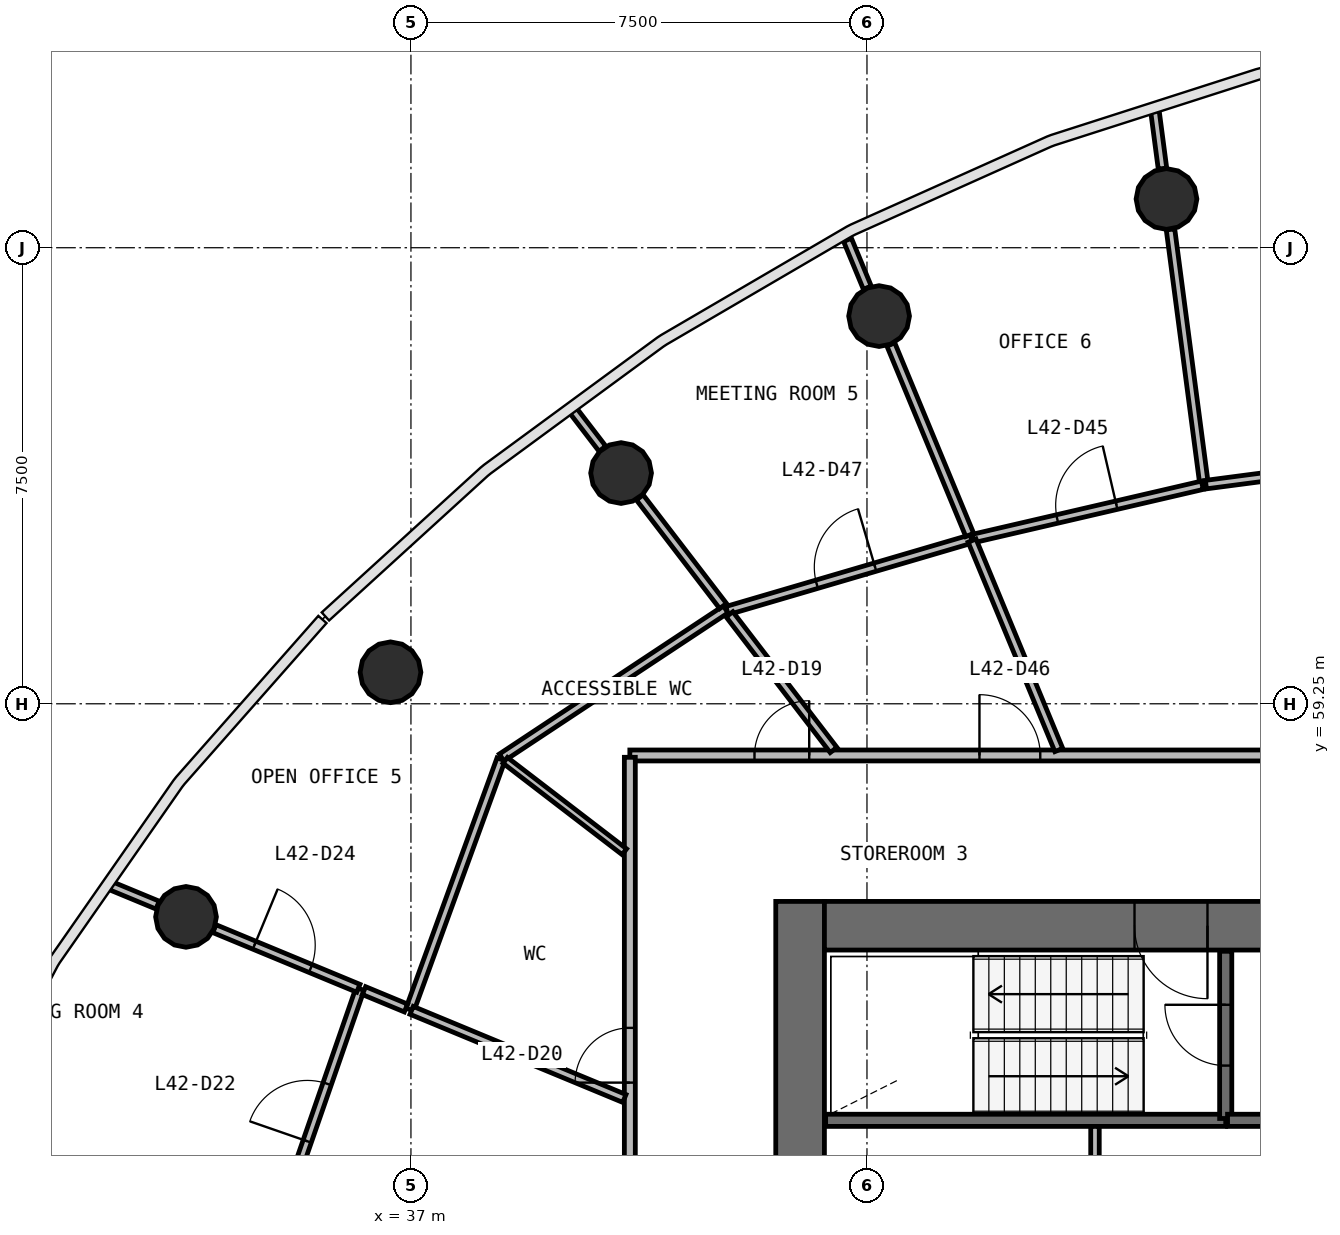
"""IFC4 building model, lengths in metres.
Left out: names, types, materials, properties, quantities, classifications, styles, units other than length and angle.
Written with IfcOpenShell. Run it as: python <this file> out.ifc"""

import sys

from ifc_helpers import new_model, si_unit, direction, frame, frame_2d, origin, origin_2d, place, context, subcontext, project, spatial, rectangle, circle, extrude, source, transform, mapped, element, fill, save


model = new_model("IFC4")
c1 = context("Model", 3, precision=1e-05, world=origin(), true_north=direction((0.0, 1.0)))
c2 = subcontext(c1, "Body", "Model", "MODEL_VIEW")
j1 = project(units=[si_unit("LENGTHUNIT", "METRE"), si_unit("PLANEANGLEUNIT", "RADIAN")], contexts=[c1])
p1 = place(None, origin())
s1 = spatial("IfcSite", under=j1, at=p1, CompositionType="ELEMENT")
p2 = place(p1, origin())
s2 = spatial("IfcBuilding", under=s1, at=p2, CompositionType="ELEMENT")
p3 = place(p2, frame((0.0, 0.0, 176.0)))
s3 = spatial("IfcBuildingStorey", under=s2, at=p3, CompositionType="ELEMENT", Elevation=176.0)
p4 = place(p3, frame((43.4, 56.0, 0.0), z_axis=(0.0, 0.0, 1.0), x_axis=(0.0, -1.0, 0.0)))
e1 = element("IfcWall", 1, at=p4, inside=s3, PredefinedType="SHEAR", context=c2, shape_type="SweptSolid", body=[
    extrude(rectangle(XDim=16.0, YDim=0.8, at=frame_2d((8.0, 0.0))), origin(), (0.0, 0.0, 1.0), 3.9),
])
p5 = place(p4, frame((7.1, 0.0, 0.0)))
e2 = element("IfcOpeningElement", 2, at=p5, cuts=e1, PredefinedType="OPENING", context=c2, shape_type="SweptSolid", body=[
    extrude(rectangle(XDim=1.8, YDim=2.1, at=frame_2d((0.9, 1.05))), frame((0.0, 0.41, 0.0), z_axis=(0.0, -1.0, 0.0), x_axis=(1.0, 0.0, 0.0)), (0.0, 0.0, 1.0), 0.82),
])
p6 = place(p3, frame((60.2, 55.6, 0.0), z_axis=(0.0, 0.0, 1.0), x_axis=(-1.0, 0.0, 0.0)))
e3 = element("IfcWall", 3, at=p6, inside=s3, PredefinedType="SHEAR", context=c2, shape_type="SweptSolid", body=[
    extrude(rectangle(XDim=16.4, YDim=0.8, at=frame_2d((8.2, 0.0))), origin(), (0.0, 0.0, 1.0), 3.9),
])
p7 = place(p6, frame((0.2, 0.0, 0.0)))
e4 = element("IfcOpeningElement", 4, at=p7, cuts=e3, PredefinedType="OPENING", context=c2, shape_type="SweptSolid", body=[
    extrude(rectangle(XDim=1.1, YDim=2.1, at=frame_2d((0.55, 1.05))), frame((0.0, 0.41, 0.0), z_axis=(0.0, -1.0, 0.0), x_axis=(1.0, 0.0, 0.0)), (0.0, 0.0, 1.0), 0.82),
])
p8 = place(p6, frame((10.1, 0.0, 0.0)))
e5 = element("IfcOpeningElement", 5, at=p8, cuts=e3, PredefinedType="OPENING", context=c2, shape_type="SweptSolid", body=[
    extrude(rectangle(XDim=1.2, YDim=2.1, at=frame_2d((0.6, 1.05))), frame((0.0, 0.41, 0.0), z_axis=(0.0, -1.0, 0.0), x_axis=(1.0, 0.0, 0.0)), (0.0, 0.0, 1.0), 0.82),
])
p9 = place(p6, frame((7.05, 0.0, 0.0)))
e6 = element("IfcOpeningElement", 6, at=p9, cuts=e3, PredefinedType="OPENING", context=c2, shape_type="SweptSolid", body=[
    extrude(rectangle(XDim=1.1, YDim=2.1, at=frame_2d((0.55, 1.05))), frame((0.0, 0.41, 0.0), z_axis=(0.0, -1.0, 0.0), x_axis=(1.0, 0.0, 0.0)), (0.0, 0.0, 1.0), 0.82),
])
m1 = source(origin(), c2, "Body", "SweptSolid", [
    extrude(circle(Radius=0.5, at=origin_2d()), origin(), (0.0, 0.0, 1.0), 3.9),
])
for number, where, z_axis, x_axis in (
    (7, (49.426, 67.551, 0.0), (0.0, 0.0, 1.0), (1.0, 0.0, 0.0)),
    (8, (44.699, 65.626, 0.0), (0.0, 0.0, 1.0), (1.0, 0.0, 0.0)),
    (9, (40.456, 63.044, 0.0), (0.0, 0.0, 1.0), (1.0, 0.0, 0.0)),
    (10, (36.664, 59.768, 0.0), (0.0, 0.0, 1.0), (1.0, 0.0, 0.0)),
    (11, (33.301, 55.746, 0.0), (0.0, 0.0, 1.0), (1.0, 0.0, 0.0)),
):
    element("IfcColumn", number, at=place(p3, frame(where, z_axis=z_axis, x_axis=x_axis)), inside=s3, PredefinedType="COLUMN", context=c2, shape_type="MappedRepresentation", body=[
        mapped(m1, transform((0.0, 0.0, 0.0), scale=1.0)),
    ])
p10 = place(p3, frame((43.82, 52.4, 0.0), z_axis=(0.0, 0.0, 1.0), x_axis=(1.0, 0.0, 0.0)))
e12 = element("IfcWall", 12, at=p10, inside=s3, PredefinedType="SOLIDWALL", context=c2, shape_type="SweptSolid", body=[
    extrude(rectangle(XDim=6.58, YDim=0.2, at=frame_2d((3.29, 0.0))), origin(), (0.0, 0.0, 1.0), 3.4),
])
p11 = place(p3, frame((50.4, 52.43, 0.0), z_axis=(0.0, 0.0, 1.0), x_axis=(0.0, 1.0, 0.0)))
e13 = element("IfcWall", 13, at=p11, inside=s3, PredefinedType="SOLIDWALL", context=c2, shape_type="SweptSolid", body=[
    extrude(rectangle(XDim=2.75, YDim=0.2, at=frame_2d((1.375, 0.0))), origin(), (0.0, 0.0, 1.0), 3.4),
])
p12 = place(p11, frame((0.87, 0.0, 0.0)))
e14 = element("IfcOpeningElement", 14, at=p12, cuts=e13, PredefinedType="OPENING", context=c2, shape_type="SweptSolid", body=[
    extrude(rectangle(XDim=1.0, YDim=2.1, at=frame_2d((0.5, 1.05))), frame((0.0, 0.11, 0.0), z_axis=(0.0, -1.0, 0.0), x_axis=(1.0, 0.0, 0.0)), (0.0, 0.0, 1.0), 0.22),
])
p13 = place(p3, frame((50.43, 52.4, 0.0), z_axis=(0.0, 0.0, 1.0), x_axis=(1.0, 0.0, 0.0)))
e15 = element("IfcWall", 15, at=p13, inside=s3, PredefinedType="SOLIDWALL", context=c2, shape_type="SweptSolid", body=[
    extrude(rectangle(XDim=2.24, YDim=0.2, at=frame_2d((1.12, 0.0))), origin(), (0.0, 0.0, 1.0), 3.4),
])
p14 = place(p3, frame((40.6, 58.4, 0.0), z_axis=(0.0, 0.0, 1.0), x_axis=(1.0, 0.0, 0.0)))
e16 = element("IfcWall", 16, at=p14, inside=s3, PredefinedType="PARTITIONING", context=c2, shape_type="SweptSolid", body=[
    extrude(rectangle(XDim=22.8, YDim=0.18, at=frame_2d((11.4, 0.0))), origin(), (0.0, 0.0, 1.0), 2.7),
])
p15 = place(p14, frame((2.05, 0.0, 0.0)))
e17 = element("IfcOpeningElement", 17, at=p15, cuts=e16, PredefinedType="OPENING", context=c2, shape_type="SweptSolid", body=[
    extrude(rectangle(XDim=0.9, YDim=2.1, at=frame_2d((0.45, 1.05))), frame((0.0, 0.1, 0.0), z_axis=(0.0, -1.0, 0.0), x_axis=(1.0, 0.0, 0.0)), (0.0, 0.0, 1.0), 0.2),
])
p16 = place(p14, frame((16.15, 0.0, 0.0)))
e18 = element("IfcOpeningElement", 18, at=p16, cuts=e16, PredefinedType="OPENING", context=c2, shape_type="SweptSolid", body=[
    extrude(rectangle(XDim=1.0, YDim=2.1, at=frame_2d((0.5, 1.05))), frame((0.0, 0.1, 0.0), z_axis=(0.0, -1.0, 0.0), x_axis=(1.0, 0.0, 0.0)), (0.0, 0.0, 1.0), 0.2),
])
p17 = place(p14, frame((10.95, 0.0, 0.0)))
e19 = element("IfcOpeningElement", 19, at=p17, cuts=e16, PredefinedType="OPENING", context=c2, shape_type="SweptSolid", body=[
    extrude(rectangle(XDim=1.0, YDim=2.1, at=frame_2d((0.5, 1.05))), frame((0.0, 0.1, 0.0), z_axis=(0.0, -1.0, 0.0), x_axis=(1.0, 0.0, 0.0)), (0.0, 0.0, 1.0), 0.2),
])
p18 = place(p14, frame((5.75, 0.0, 0.0)))
e20 = element("IfcOpeningElement", 20, at=p18, cuts=e16, PredefinedType="OPENING", context=c2, shape_type="SweptSolid", body=[
    extrude(rectangle(XDim=1.0, YDim=2.1, at=frame_2d((0.5, 1.05))), frame((0.0, 0.1, 0.0), z_axis=(0.0, -1.0, 0.0), x_axis=(1.0, 0.0, 0.0)), (0.0, 0.0, 1.0), 0.2),
])
p19 = place(p3, frame((40.6, 37.63, 0.0), z_axis=(0.0, 0.0, 1.0), x_axis=(0.0, 1.0, 0.0)))
e21 = element("IfcWall", 21, at=p19, inside=s3, PredefinedType="PARTITIONING", context=c2, shape_type="SweptSolid", body=[
    extrude(rectangle(XDim=20.74, YDim=0.18, at=frame_2d((10.37, 0.0))), origin(), (0.0, 0.0, 1.0), 2.7),
])
p20 = place(p19, frame((15.39, 0.0, 0.0)))
e22 = element("IfcOpeningElement", 22, at=p20, cuts=e21, PredefinedType="OPENING", context=c2, shape_type="SweptSolid", body=[
    extrude(rectangle(XDim=0.9, YDim=2.1, at=frame_2d((0.45, 1.05))), frame((0.0, 0.1, 0.0), z_axis=(0.0, -1.0, 0.0), x_axis=(1.0, 0.0, 0.0)), (0.0, 0.0, 1.0), 0.2),
])
p21 = place(p19, frame((9.89, 0.0, 0.0)))
e23 = element("IfcOpeningElement", 23, at=p21, cuts=e21, PredefinedType="OPENING", context=c2, shape_type="SweptSolid", body=[
    extrude(rectangle(XDim=1.0, YDim=2.1, at=frame_2d((0.5, 1.05))), frame((0.0, 0.1, 0.0), z_axis=(0.0, -1.0, 0.0), x_axis=(1.0, 0.0, 0.0)), (0.0, 0.0, 1.0), 0.2),
])
p22 = place(p19, frame((7.69, 0.0, 0.0)))
e24 = element("IfcOpeningElement", 24, at=p22, cuts=e21, PredefinedType="OPENING", context=c2, shape_type="SweptSolid", body=[
    extrude(rectangle(XDim=1.0, YDim=2.1, at=frame_2d((0.5, 1.05))), frame((0.0, 0.1, 0.0), z_axis=(0.0, -1.0, 0.0), x_axis=(1.0, 0.0, 0.0)), (0.0, 0.0, 1.0), 0.2),
])
p23 = place(p3, frame((34.689, 50.309, 0.0), z_axis=(0.0, 0.0, 1.0), x_axis=(0.327550319444, 0.944833735761, 0.0)))
e25 = element("IfcWall", 25, at=p23, inside=s3, PredefinedType="PARTITIONING", context=c2, shape_type="SweptSolid", body=[
    extrude(rectangle(XDim=4.5, YDim=0.14, at=frame_2d((2.25, 0.0))), origin(), (0.0, 0.0, 1.0), 2.7),
])
p24 = place(p23, frame((1.85, 0.0, 0.0)))
e26 = element("IfcOpeningElement", 26, at=p24, cuts=e25, PredefinedType="OPENING", context=c2, shape_type="SweptSolid", body=[
    extrude(rectangle(XDim=1.0, YDim=2.1, at=frame_2d((0.5, 1.05))), frame((0.0, 0.08, 0.0), z_axis=(0.0, -1.0, 0.0), x_axis=(1.0, 0.0, 0.0)), (0.0, 0.0, 1.0), 0.16),
])
p25 = place(p3, frame((42.177, 60.802, 0.0), z_axis=(0.0, 0.0, 1.0), x_axis=(-0.83401747031, -0.551738034957, 0.0)))
e27 = element("IfcWall", 27, at=p25, inside=s3, PredefinedType="PARTITIONING", context=c2, shape_type="SweptSolid", body=[
    extrude(rectangle(XDim=4.418, YDim=0.14, at=frame_2d((2.209, 0.0))), origin(), (0.0, 0.0, 1.0), 2.7),
])
p26 = place(p3, frame((38.482, 58.337, 0.0), z_axis=(0.0, 0.0, 1.0), x_axis=(-0.342007049078, -0.939697386599, 0.0)))
e28 = element("IfcWall", 28, at=p26, inside=s3, PredefinedType="PARTITIONING", context=c2, shape_type="SweptSolid", body=[
    extrude(rectangle(XDim=4.381, YDim=0.14, at=frame_2d((2.19, 0.0))), origin(), (0.0, 0.0, 1.0), 2.7),
])
p27 = place(p3, frame((50.045, 62.85, 0.0), z_axis=(0.0, 0.0, 1.0), x_axis=(-0.130506679213, 0.991447430115, 0.0)))
e29 = element("IfcWall", 29, at=p27, inside=s3, PredefinedType="PARTITIONING", context=c2, shape_type="SweptSolid", body=[
    extrude(rectangle(XDim=4.237, YDim=0.14, at=frame_2d((2.119, 0.0))), origin(), (0.0, 0.0, 1.0), 2.7),
])
p28 = place(p3, frame((42.199, 60.782, 0.0), z_axis=(0.0, 0.0, 1.0), x_axis=(0.959552813839, 0.28152867963, 0.0)))
e30 = element("IfcWall", 30, at=p28, inside=s3, PredefinedType="PARTITIONING", context=c2, shape_type="SweptSolid", body=[
    extrude(rectangle(XDim=4.188, YDim=0.14, at=frame_2d((2.094, 0.0))), origin(), (0.0, 0.0, 1.0), 2.7),
])
p29 = place(p28, frame((1.538, 0.0, 0.0)))
e31 = element("IfcOpeningElement", 31, at=p29, cuts=e30, PredefinedType="OPENING", context=c2, shape_type="SweptSolid", body=[
    extrude(rectangle(XDim=1.0, YDim=2.1, at=frame_2d((0.5, 1.05))), frame((0.0, 0.08, 0.0), z_axis=(0.0, -1.0, 0.0), x_axis=(1.0, 0.0, 0.0)), (0.0, 0.0, 1.0), 0.16),
])
p30 = place(p3, frame((50.075, 62.854, 0.0), z_axis=(0.0, 0.0, 1.0), x_axis=(0.991489154897, 0.130189307246, 0.0)))
e32 = element("IfcWall", 32, at=p30, inside=s3, PredefinedType="PARTITIONING", context=c2, shape_type="SweptSolid", body=[
    extrude(rectangle(XDim=3.953, YDim=0.14, at=frame_2d((1.977, 0.0))), origin(), (0.0, 0.0, 1.0), 2.7),
])
p31 = place(p30, frame((1.503, 0.0, 0.0)))
e33 = element("IfcOpeningElement", 33, at=p31, cuts=e32, PredefinedType="OPENING", context=c2, shape_type="SweptSolid", body=[
    extrude(rectangle(XDim=1.0, YDim=2.1, at=frame_2d((0.5, 1.05))), frame((0.0, 0.08, 0.0), z_axis=(0.0, -1.0, 0.0), x_axis=(1.0, 0.0, 0.0)), (0.0, 0.0, 1.0), 0.16),
])
p32 = place(p3, frame((46.246, 61.968, 0.0), z_axis=(0.0, 0.0, 1.0), x_axis=(0.974087273118, 0.226172465941, 0.0)))
e34 = element("IfcWall", 34, at=p32, inside=s3, PredefinedType="PARTITIONING", context=c2, shape_type="SweptSolid", body=[
    extrude(rectangle(XDim=3.87, YDim=0.14, at=frame_2d((1.935, 0.0))), origin(), (0.0, 0.0, 1.0), 2.7),
])
p33 = place(p32, frame((1.42, 0.0, 0.0)))
e35 = element("IfcOpeningElement", 35, at=p33, cuts=e34, PredefinedType="OPENING", context=c2, shape_type="SweptSolid", body=[
    extrude(rectangle(XDim=1.0, YDim=2.1, at=frame_2d((0.5, 1.05))), frame((0.0, 0.08, 0.0), z_axis=(0.0, -1.0, 0.0), x_axis=(1.0, 0.0, 0.0)), (0.0, 0.0, 1.0), 0.16),
])
p34 = place(p3, frame((40.51, 52.759, 0.0), z_axis=(0.0, 0.0, 1.0), x_axis=(-0.92389112775, 0.382655437784, 0.0)))
e36 = element("IfcWall", 36, at=p34, inside=s3, PredefinedType="PARTITIONING", context=c2, shape_type="SweptSolid", body=[
    extrude(rectangle(XDim=3.787, YDim=0.14, at=frame_2d((1.894, 0.0))), origin(), (0.0, 0.0, 1.0), 2.7),
])
p35 = place(p3, frame((47.655, 58.49, 0.0), z_axis=(0.0, 0.0, 1.0), x_axis=(-0.382656467663, 0.923890701196, 0.0)))
e37 = element("IfcWall", 37, at=p35, inside=s3, PredefinedType="PARTITIONING", context=c2, shape_type="SweptSolid", body=[
    extrude(rectangle(XDim=3.727, YDim=0.14, at=frame_2d((1.864, 0.0))), origin(), (0.0, 0.0, 1.0), 2.7),
])
p36 = place(p3, frame((46.19, 62.027, 0.0), z_axis=(0.0, 0.0, 1.0), x_axis=(-0.382697308523, 0.923873784696, 0.0)))
e38 = element("IfcWall", 38, at=p36, inside=s3, PredefinedType="PARTITIONING", context=c2, shape_type="SweptSolid", body=[
    extrude(rectangle(XDim=3.391, YDim=0.14, at=frame_2d((1.695, 0.0))), origin(), (0.0, 0.0, 1.0), 2.7),
])
p37 = place(p3, frame((43.951, 58.49, 0.0), z_axis=(0.0, 0.0, 1.0), x_axis=(-0.608728570765, 0.793378552228, 0.0)))
e39 = element("IfcWall", 39, at=p37, inside=s3, PredefinedType="PARTITIONING", context=c2, shape_type="SweptSolid", body=[
    extrude(rectangle(XDim=2.812, YDim=0.14, at=frame_2d((1.406, 0.0))), origin(), (0.0, 0.0, 1.0), 2.7),
])
p38 = place(p3, frame((33.767, 55.552, 0.0), z_axis=(0.0, 0.0, 1.0), x_axis=(0.923880985108, -0.382679925467, 0.0)))
e40 = element("IfcWall", 40, at=p38, inside=s3, PredefinedType="PARTITIONING", context=c2, shape_type="SweptSolid", body=[
    extrude(rectangle(XDim=2.563, YDim=0.14, at=frame_2d((1.281, 0.0))), origin(), (0.0, 0.0, 1.0), 2.7),
])
p39 = place(p38, frame((0.713, 0.0, 0.0)))
e41 = element("IfcOpeningElement", 41, at=p39, cuts=e40, PredefinedType="OPENING", context=c2, shape_type="SweptSolid", body=[
    extrude(rectangle(XDim=1.0, YDim=2.1, at=frame_2d((0.5, 1.05))), frame((0.0, 0.08, 0.0), z_axis=(0.0, -1.0, 0.0), x_axis=(1.0, 0.0, 0.0)), (0.0, 0.0, 1.0), 0.16),
])
p40 = place(p3, frame((48.25, 50.01, 0.0), z_axis=(0.0, 0.0, 1.0), x_axis=(0.0, 1.0, 0.0)))
e42 = element("IfcWall", 42, at=p40, inside=s3, PredefinedType="PARTITIONING", context=c2, shape_type="SweptSolid", body=[
    extrude(rectangle(XDim=2.29, YDim=0.14, at=frame_2d((1.145, 0.0))), origin(), (0.0, 0.0, 1.0), 2.7),
])
p41 = place(p3, frame((42.134, 60.858, 0.0), z_axis=(0.0, 0.0, 1.0), x_axis=(-0.608725150362, 0.793381176558, 0.0)))
e43 = element("IfcWall", 43, at=p41, inside=s3, PredefinedType="PARTITIONING", context=c2, shape_type="SweptSolid", body=[
    extrude(rectangle(XDim=2.252, YDim=0.14, at=frame_2d((1.126, 0.0))), origin(), (0.0, 0.0, 1.0), 2.7),
])
p42 = place(p3, frame((49.36, 68.052, 0.0), z_axis=(0.0, 0.0, 1.0), x_axis=(-0.130434626054, 0.991456911987, 0.0)))
e44 = element("IfcWall", 44, at=p42, inside=s3, PredefinedType="PARTITIONING", context=c2, shape_type="SweptSolid", body=[
    extrude(rectangle(XDim=0.953, YDim=0.14, at=frame_2d((0.476, 0.0))), origin(), (0.0, 0.0, 1.0), 2.7),
])
p43 = place(p3, frame((36.919, 54.247, 0.0), z_axis=(0.0, 0.0, 1.0), x_axis=(-0.923885623343, 0.382668727465, 0.0)))
e45 = element("IfcWall", 45, at=p43, inside=s3, PredefinedType="PARTITIONING", context=c2, shape_type="SweptSolid", body=[
    extrude(rectangle(XDim=0.748, YDim=0.14, at=frame_2d((0.374, 0.0))), origin(), (0.0, 0.0, 1.0), 2.7),
])
p44 = place(p3, frame((44.506, 66.092, 0.0), z_axis=(0.0, 0.0, 1.0), x_axis=(-0.382722863119, 0.923863198772, 0.0)))
e46 = element("IfcWall", 46, at=p44, inside=s3, PredefinedType="PARTITIONING", context=c2, shape_type="SweptSolid", body=[
    extrude(rectangle(XDim=0.852, YDim=0.14, at=frame_2d((0.426, 0.0))), origin(), (0.0, 0.0, 1.0), 2.7),
])
p45 = place(p3, frame((32.834, 55.939, 0.0), z_axis=(0.0, 0.0, 1.0), x_axis=(-0.923909393783, 0.382611332921, 0.0)))
e47 = element("IfcWall", 47, at=p45, inside=s3, PredefinedType="PARTITIONING", context=c2, shape_type="SweptSolid", body=[
    extrude(rectangle(XDim=0.831, YDim=0.14, at=frame_2d((0.416, 0.0))), origin(), (0.0, 0.0, 1.0), 2.7),
])
p46 = place(p3, frame((40.149, 63.445, 0.0), z_axis=(0.0, 0.0, 1.0), x_axis=(-0.608659697441, 0.793431391307, 0.0)))
e48 = element("IfcWall", 48, at=p46, inside=s3, PredefinedType="PARTITIONING", context=c2, shape_type="SweptSolid", body=[
    extrude(rectangle(XDim=0.786, YDim=0.14, at=frame_2d((0.393, 0.0))), origin(), (0.0, 0.0, 1.0), 2.7),
])
p47 = place(p3, frame((40.51, 56.817, 0.0), z_axis=(0.0, 0.0, 1.0), x_axis=(-0.793380380559, 0.608726187825, 0.0)))
e49 = element("IfcWall", 49, at=p47, inside=s3, PredefinedType="PARTITIONING", context=c2, shape_type="SweptSolid", body=[
    extrude(rectangle(XDim=2.47, YDim=0.12, at=frame_2d((1.235, 0.0))), origin(), (0.0, 0.0, 1.0), 2.7),
])
m2 = source(origin(), c2, "Body", "SweptSolid", [
    extrude(rectangle(XDim=1.2, YDim=2.1, at=frame_2d((0.6, 1.05))), frame((0.0, 0.025, 0.0), z_axis=(0.0, -1.0, 0.0), x_axis=(1.0, 0.0, 0.0)), (0.0, 0.0, 1.0), 0.05),
])
p48 = place(p8, origin())
e50 = element("IfcDoor", 50, at=p48, inside=s3, OperationType="SINGLE_SWING_LEFT", PredefinedType="DOOR", context=c2, shape_type="MappedRepresentation", body=[
    mapped(m2, transform((0.0, 0.0, 0.0), scale=1.0)),
])
fill(e5, e50)
m3 = source(origin(), c2, "Body", "SweptSolid", [
    extrude(rectangle(XDim=1.0, YDim=2.1, at=frame_2d((0.5, 1.05))), frame((0.0, 0.025, 0.0), z_axis=(0.0, -1.0, 0.0), x_axis=(1.0, 0.0, 0.0)), (0.0, 0.0, 1.0), 0.05),
])
p49 = place(p12, origin())
e51 = element("IfcDoor", 51, at=p49, inside=s3, OperationType="SINGLE_SWING_RIGHT", PredefinedType="DOOR", context=c2, shape_type="MappedRepresentation", body=[
    mapped(m3, transform((0.0, 0.0, 0.0), scale=1.0)),
])
fill(e14, e51)
m4 = source(origin(), c2, "Body", "SweptSolid", [
    extrude(rectangle(XDim=0.9, YDim=2.1, at=frame_2d((0.45, 1.05))), frame((0.0, 0.025, 0.0), z_axis=(0.0, -1.0, 0.0), x_axis=(1.0, 0.0, 0.0)), (0.0, 0.0, 1.0), 0.05),
])
p50 = place(p15, origin())
e52 = element("IfcDoor", 52, at=p50, inside=s3, OperationType="SINGLE_SWING_RIGHT", PredefinedType="DOOR", context=c2, shape_type="MappedRepresentation", body=[
    mapped(m4, transform((0.0, 0.0, 0.0), scale=1.0)),
])
fill(e17, e52)
p51 = place(p20, origin())
e53 = element("IfcDoor", 53, at=p51, inside=s3, OperationType="SINGLE_SWING_LEFT", PredefinedType="DOOR", context=c2, shape_type="MappedRepresentation", body=[
    mapped(m4, transform((0.0, 0.0, 0.0), scale=1.0)),
])
fill(e22, e53)
m5 = source(origin(), c2, "Body", "SweptSolid", [
    extrude(rectangle(XDim=1.0, YDim=2.1, at=frame_2d((0.5, 1.05))), frame((0.0, 0.025, 0.0), z_axis=(0.0, -1.0, 0.0), x_axis=(1.0, 0.0, 0.0)), (0.0, 0.0, 1.0), 0.05),
])
p52 = place(p24, origin())
e54 = element("IfcDoor", 54, at=p52, inside=s3, OperationType="SINGLE_SWING_LEFT", PredefinedType="DOOR", context=c2, shape_type="MappedRepresentation", body=[
    mapped(m5, transform((0.0, 0.0, 0.0), scale=1.0)),
])
fill(e26, e54)
p53 = place(p39, origin())
e55 = element("IfcDoor", 55, at=p53, inside=s3, OperationType="SINGLE_SWING_LEFT", PredefinedType="DOOR", context=c2, shape_type="MappedRepresentation", body=[
    mapped(m5, transform((0.0, 0.0, 0.0), scale=1.0)),
])
fill(e41, e55)
p54 = place(p33, origin())
e56 = element("IfcDoor", 56, at=p54, inside=s3, OperationType="SINGLE_SWING_RIGHT", PredefinedType="DOOR", context=c2, shape_type="MappedRepresentation", body=[
    mapped(m5, transform((0.0, 0.0, 0.0), scale=1.0)),
])
fill(e35, e56)
p55 = place(p18, origin())
e57 = element("IfcDoor", 57, at=p55, inside=s3, OperationType="SINGLE_SWING_LEFT", PredefinedType="DOOR", context=c2, shape_type="MappedRepresentation", body=[
    mapped(m5, transform((0.0, 0.0, 0.0), scale=1.0)),
])
fill(e20, e57)
p56 = place(p29, origin())
e58 = element("IfcDoor", 58, at=p56, inside=s3, OperationType="SINGLE_SWING_RIGHT", PredefinedType="DOOR", context=c2, shape_type="MappedRepresentation", body=[
    mapped(m5, transform((0.0, 0.0, 0.0), scale=1.0)),
])
fill(e31, e58)
save(model, sys.argv[1])
